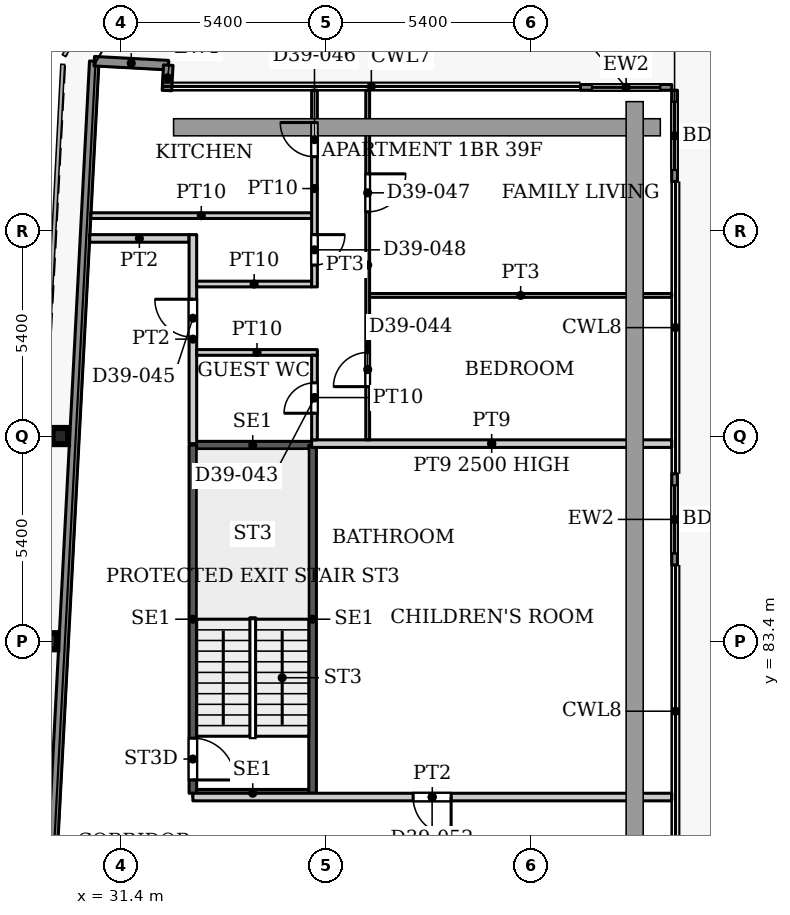
"""IFC4 building model, lengths in metres.
Left out: names, types, materials, properties, quantities, classifications, styles, units other than length and angle.
Written with IfcOpenShell. Run it as: python <this file> out.ifc"""

import sys

from ifc_helpers import new_model, si_unit, direction, frame, frame_2d, origin, origin_2d, place, context, subcontext, project, spatial, rectangle, i_section, extrude, source, transform, mapped, element, fill, save


model = new_model("IFC4")
c1 = context("Model", 3, precision=1e-05, world=origin(), true_north=direction((0.0, 1.0)))
c2 = subcontext(c1, "Body", "Model", "MODEL_VIEW")
j1 = project(units=[si_unit("LENGTHUNIT", "METRE"), si_unit("PLANEANGLEUNIT", "RADIAN")], contexts=[c1])
p1 = place(None, origin())
s1 = spatial("IfcSite", under=j1, at=p1, CompositionType="ELEMENT")
p2 = place(p1, origin())
s2 = spatial("IfcBuilding", under=s1, at=p2, CompositionType="ELEMENT")
p3 = place(p2, frame((0.0, 0.0, 168.2)))
s3 = spatial("IfcBuildingStorey", under=s2, at=p3, CompositionType="ELEMENT", Elevation=168.2)
for number, where, z_axis, x_axis in (
    (1, (29.527, 83.4, 0.0), (0.0, 0.0, 1.0), (1.0, 0.0, 0.0)),
    (2, (29.811, 88.8, 0.0), (0.0, 0.0, 1.0), (1.0, 0.0, 0.0)),
):
    element("IfcColumn", number, at=place(p3, frame(where, z_axis=z_axis, x_axis=x_axis)), inside=s3, PredefinedType="COLUMN", context=c2, shape_type="SweptSolid", body=[
        extrude(i_section(OverallWidth=0.409, OverallDepth=0.425, WebThickness=0.033, FlangeThickness=0.052, FilletRadius=0.013, at=origin_2d()), origin(), (0.0, 0.0, 1.0), 3.9),
    ])
p4 = place(p3, frame((27.195, 31.969, 0.0), z_axis=(0.0, 0.0, 1.0), x_axis=(0.052554995867, 0.998618031286, 0.0)))
e3 = element("IfcWall", 3, at=p4, inside=s3, PredefinedType="SOLIDWALL", context=c2, shape_type="SweptSolid", body=[
    extrude(rectangle(XDim=66.787, YDim=0.25, at=frame_2d((33.394, 0.0))), origin(), (0.0, 0.0, 1.0), 3.75),
])
p5 = place(p3, frame((30.705, 98.664, 0.0), z_axis=(0.0, 0.0, 1.0), x_axis=(0.998577785791, -0.053314216913, 0.0)))
e4 = element("IfcWall", 4, at=p5, inside=s3, PredefinedType="SOLIDWALL", context=c2, shape_type="SweptSolid", body=[
    extrude(rectangle(XDim=1.951, YDim=0.25, at=frame_2d((0.975, 0.0))), origin(), (0.0, 0.0, 1.0), 3.75),
])
p6 = place(p3, frame((32.653, 98.56, 0.0), z_axis=(0.0, 0.0, 1.0), x_axis=(-0.054093451632, -0.998535877418, 0.0)))
e5 = element("IfcWall", 5, at=p6, inside=s3, PredefinedType="SOLIDWALL", context=c2, shape_type="SweptSolid", body=[
    extrude(rectangle(XDim=0.668, YDim=0.25, at=frame_2d((0.334, 0.0))), origin(), (0.0, 0.0, 1.0), 3.75),
])
p7 = place(p3, frame((43.5, 97.975, 0.0), z_axis=(0.0, 0.0, 1.0), x_axis=(1.0, 0.0, 0.0)))
e6 = element("IfcWall", 6, at=p7, inside=s3, PredefinedType="SOLIDWALL", context=c2, shape_type="SweptSolid", body=[
    extrude(rectangle(XDim=2.4, YDim=0.15, at=frame_2d((1.2, 0.0))), origin(), (0.0, 0.0, 1.0), 3.75),
])
p8 = place(p7, frame((0.3, 0.0, 0.0)))
e7 = element("IfcOpeningElement", 7, at=p8, cuts=e6, PredefinedType="OPENING", context=c2, shape_type="SweptSolid", body=[
    extrude(rectangle(XDim=1.8, YDim=2.4, at=frame_2d((0.9, 1.2))), frame((0.0, 0.085, 0.0), z_axis=(0.0, -1.0, 0.0), x_axis=(1.0, 0.0, 0.0)), (0.0, 0.0, 1.0), 0.17),
])
p9 = place(p3, frame((45.975, 97.9, 0.0), z_axis=(0.0, 0.0, 1.0), x_axis=(0.0, -1.0, 0.0)))
e8 = element("IfcWall", 8, at=p9, inside=s3, PredefinedType="SOLIDWALL", context=c2, shape_type="SweptSolid", body=[
    extrude(rectangle(XDim=2.4, YDim=0.15, at=frame_2d((1.2, 0.0))), origin(), (0.0, 0.0, 1.0), 3.75),
])
p10 = place(p9, frame((0.3, 0.0, 0.0)))
e9 = element("IfcOpeningElement", 9, at=p10, cuts=e8, PredefinedType="OPENING", context=c2, shape_type="SweptSolid", body=[
    extrude(rectangle(XDim=1.8, YDim=2.4, at=frame_2d((0.9, 1.2))), frame((0.0, 0.085, 0.0), z_axis=(0.0, -1.0, 0.0), x_axis=(1.0, 0.0, 0.0)), (0.0, 0.0, 1.0), 0.17),
])
p11 = place(p3, frame((45.975, 87.806, 0.0), z_axis=(0.0, 0.0, 1.0), x_axis=(0.0, -1.0, 0.0)))
e10 = element("IfcWall", 10, at=p11, inside=s3, PredefinedType="SOLIDWALL", context=c2, shape_type="SweptSolid", body=[
    extrude(rectangle(XDim=2.4, YDim=0.15, at=frame_2d((1.2, 0.0))), origin(), (0.0, 0.0, 1.0), 3.75),
])
p12 = place(p11, frame((0.3, 0.0, 0.0)))
e11 = element("IfcOpeningElement", 11, at=p12, cuts=e10, PredefinedType="OPENING", context=c2, shape_type="SweptSolid", body=[
    extrude(rectangle(XDim=1.8, YDim=2.4, at=frame_2d((0.9, 1.2))), frame((0.0, 0.085, 0.0), z_axis=(0.0, -1.0, 0.0), x_axis=(1.0, 0.0, 0.0)), (0.0, 0.0, 1.0), 0.17),
])
for number, where, z_axis, x_axis in (
    (12, (33.3, 79.4, 0.0), (0.0, 0.0, 1.0), (1.0, 0.0, 0.0)),
    (13, (33.3, 88.56, 0.0), (0.0, 0.0, 1.0), (1.0, 0.0, 0.0)),
):
    element("IfcWall", number, at=place(p3, frame(where, z_axis=z_axis, x_axis=x_axis)), inside=s3, PredefinedType="SHEAR", context=c2, shape_type="SweptSolid", body=[
        extrude(rectangle(XDim=3.15, YDim=0.2, at=frame_2d((1.575, 0.0))), origin(), (0.0, 0.0, 1.0), 3.9),
    ])
p13 = place(p3, frame((33.3, 79.4, 0.0), z_axis=(0.0, 0.0, 1.0), x_axis=(0.0, 1.0, 0.0)))
e14 = element("IfcWall", 14, at=p13, inside=s3, PredefinedType="SHEAR", context=c2, shape_type="SweptSolid", body=[
    extrude(rectangle(XDim=9.16, YDim=0.2, at=frame_2d((4.58, 0.0))), origin(), (0.0, 0.0, 1.0), 3.9),
])
p14 = place(p13, frame((0.35, 0.0, 0.0)))
e15 = element("IfcOpeningElement", 15, at=p14, cuts=e14, PredefinedType="OPENING", context=c2, shape_type="SweptSolid", body=[
    extrude(rectangle(XDim=1.1, YDim=2.2, at=frame_2d((0.55, 1.1))), frame((0.0, 0.11, 0.0), z_axis=(0.0, -1.0, 0.0), x_axis=(1.0, 0.0, 0.0)), (0.0, 0.0, 1.0), 0.22),
])
p15 = place(p3, frame((36.45, 79.4, 0.0), z_axis=(0.0, 0.0, 1.0), x_axis=(0.0, 1.0, 0.0)))
e16 = element("IfcWall", 16, at=p15, inside=s3, PredefinedType="SHEAR", context=c2, shape_type="SweptSolid", body=[
    extrude(rectangle(XDim=9.16, YDim=0.2, at=frame_2d((4.58, 0.0))), origin(), (0.0, 0.0, 1.0), 3.9),
])
p16 = place(p3, frame((30.617, 94.6, 0.0), z_axis=(0.0, 0.0, 1.0), x_axis=(1.0, 0.0, 0.0)))
e17 = element("IfcWall", 17, at=p16, inside=s3, PredefinedType="PARTITIONING", context=c2, shape_type="SweptSolid", body=[
    extrude(rectangle(XDim=5.808, YDim=0.15, at=frame_2d((2.904, 0.0))), origin(), (0.0, 0.0, 1.0), 3.6),
])
p17 = place(p3, frame((30.585, 94.0, 0.0), z_axis=(0.0, 0.0, 1.0), x_axis=(1.0, 0.0, 0.0)))
e18 = element("IfcWall", 18, at=p17, inside=s3, PredefinedType="PARTITIONING", context=c2, shape_type="SweptSolid", body=[
    extrude(rectangle(XDim=2.615, YDim=0.2, at=frame_2d((1.308, 0.0))), origin(), (0.0, 0.0, 1.0), 3.6),
])
p18 = place(p3, frame((33.3, 79.3, 0.0), z_axis=(0.0, 0.0, 1.0), x_axis=(1.0, 0.0, 0.0)))
e19 = element("IfcWall", 19, at=p18, inside=s3, PredefinedType="PARTITIONING", context=c2, shape_type="SweptSolid", body=[
    extrude(rectangle(XDim=12.6, YDim=0.2, at=frame_2d((6.3, 0.0))), origin(), (0.0, 0.0, 1.0), 3.6),
])
p19 = place(p18, frame((5.795, 0.0, 0.0)))
e20 = element("IfcOpeningElement", 20, at=p19, cuts=e19, PredefinedType="OPENING", context=c2, shape_type="SweptSolid", body=[
    extrude(rectangle(XDim=1.0, YDim=2.1, at=frame_2d((0.5, 1.05))), frame((0.0, 0.11, 0.0), z_axis=(0.0, -1.0, 0.0), x_axis=(1.0, 0.0, 0.0)), (0.0, 0.0, 1.0), 0.22),
])
p20 = place(p3, frame((33.3, 88.6, 0.0), z_axis=(0.0, 0.0, 1.0), x_axis=(0.0, 1.0, 0.0)))
e21 = element("IfcWall", 21, at=p20, inside=s3, PredefinedType="PARTITIONING", context=c2, shape_type="SweptSolid", body=[
    extrude(rectangle(XDim=5.5, YDim=0.2, at=frame_2d((2.75, 0.0))), origin(), (0.0, 0.0, 1.0), 3.6),
])
p21 = place(p20, frame((2.8, 0.0, 0.0)))
e22 = element("IfcOpeningElement", 22, at=p21, cuts=e21, PredefinedType="OPENING", context=c2, shape_type="SweptSolid", body=[
    extrude(rectangle(XDim=1.0, YDim=2.1, at=frame_2d((0.5, 1.05))), frame((0.0, 0.11, 0.0), z_axis=(0.0, -1.0, 0.0), x_axis=(1.0, 0.0, 0.0)), (0.0, 0.0, 1.0), 0.22),
])
p22 = place(p3, frame((33.4, 91.0, 0.0), z_axis=(0.0, 0.0, 1.0), x_axis=(1.0, 0.0, 0.0)))
e23 = element("IfcWall", 23, at=p22, inside=s3, PredefinedType="PARTITIONING", context=c2, shape_type="SweptSolid", body=[
    extrude(rectangle(XDim=3.175, YDim=0.15, at=frame_2d((1.587, 0.0))), origin(), (0.0, 0.0, 1.0), 3.6),
])
p23 = place(p3, frame((33.4, 92.8, 0.0), z_axis=(0.0, 0.0, 1.0), x_axis=(1.0, 0.0, 0.0)))
e24 = element("IfcWall", 24, at=p23, inside=s3, PredefinedType="PARTITIONING", context=c2, shape_type="SweptSolid", body=[
    extrude(rectangle(XDim=3.025, YDim=0.15, at=frame_2d((1.513, 0.0))), origin(), (0.0, 0.0, 1.0), 3.6),
])
p24 = place(p3, frame((36.425, 88.6, 0.0), z_axis=(0.0, 0.0, 1.0), x_axis=(1.0, 0.0, 0.0)))
e25 = element("IfcWall", 25, at=p24, inside=s3, PredefinedType="PARTITIONING", context=c2, shape_type="SweptSolid", body=[
    extrude(rectangle(XDim=9.475, YDim=0.2, at=frame_2d((4.737, 0.0))), origin(), (0.0, 0.0, 1.0), 2.5),
])
p25 = place(p3, frame((36.5, 88.7, 0.0), z_axis=(0.0, 0.0, 1.0), x_axis=(0.0, 1.0, 0.0)))
e26 = element("IfcWall", 26, at=p25, inside=s3, PredefinedType="PARTITIONING", context=c2, shape_type="SweptSolid", body=[
    extrude(rectangle(XDim=2.225, YDim=0.15, at=frame_2d((1.113, 0.0))), origin(), (0.0, 0.0, 1.0), 3.6),
])
p26 = place(p25, frame((0.7, 0.0, 0.0)))
e27 = element("IfcOpeningElement", 27, at=p26, cuts=e26, PredefinedType="OPENING", context=c2, shape_type="SweptSolid", body=[
    extrude(rectangle(XDim=0.8, YDim=2.1, at=frame_2d((0.4, 1.05))), frame((0.0, 0.085, 0.0), z_axis=(0.0, -1.0, 0.0), x_axis=(1.0, 0.0, 0.0)), (0.0, 0.0, 1.0), 0.17),
])
p27 = place(p3, frame((36.5, 92.725, 0.0), z_axis=(0.0, 0.0, 1.0), x_axis=(0.0, 1.0, 0.0)))
e28 = element("IfcWall", 28, at=p27, inside=s3, PredefinedType="PARTITIONING", context=c2, shape_type="SweptSolid", body=[
    extrude(rectangle(XDim=5.175, YDim=0.15, at=frame_2d((2.587, 0.0))), origin(), (0.0, 0.0, 1.0), 3.6),
])
p28 = place(p27, frame((3.425, 0.0, 0.0)))
e29 = element("IfcOpeningElement", 29, at=p28, cuts=e28, PredefinedType="OPENING", context=c2, shape_type="SweptSolid", body=[
    extrude(rectangle(XDim=0.9, YDim=2.1, at=frame_2d((0.45, 1.05))), frame((0.0, 0.085, 0.0), z_axis=(0.0, -1.0, 0.0), x_axis=(1.0, 0.0, 0.0)), (0.0, 0.0, 1.0), 0.17),
])
p29 = place(p27, frame((0.575, 0.0, 0.0)))
e30 = element("IfcOpeningElement", 30, at=p29, cuts=e28, PredefinedType="OPENING", context=c2, shape_type="SweptSolid", body=[
    extrude(rectangle(XDim=0.8, YDim=2.1, at=frame_2d((0.4, 1.05))), frame((0.0, 0.085, 0.0), z_axis=(0.0, -1.0, 0.0), x_axis=(1.0, 0.0, 0.0)), (0.0, 0.0, 1.0), 0.17),
])
p30 = place(p3, frame((37.9, 88.7, 0.0), z_axis=(0.0, 0.0, 1.0), x_axis=(0.0, 1.0, 0.0)))
e31 = element("IfcWall", 31, at=p30, inside=s3, PredefinedType="PARTITIONING", context=c2, shape_type="SweptSolid", body=[
    extrude(rectangle(XDim=9.2, YDim=0.1, at=frame_2d((4.6, 0.0))), origin(), (0.0, 0.0, 1.0), 3.6),
])
p31 = place(p30, frame((1.4, 0.0, 0.0)))
e32 = element("IfcOpeningElement", 32, at=p31, cuts=e31, PredefinedType="OPENING", context=c2, shape_type="SweptSolid", body=[
    extrude(rectangle(XDim=0.9, YDim=2.1, at=frame_2d((0.45, 1.05))), frame((0.0, 0.06, 0.0), z_axis=(0.0, -1.0, 0.0), x_axis=(1.0, 0.0, 0.0)), (0.0, 0.0, 1.0), 0.12),
])
p32 = place(p30, frame((6.0, 0.0, 0.0)))
e33 = element("IfcOpeningElement", 33, at=p32, cuts=e31, PredefinedType="OPENING", context=c2, shape_type="SweptSolid", body=[
    extrude(rectangle(XDim=1.0, YDim=2.1, at=frame_2d((0.5, 1.05))), frame((0.0, 0.06, 0.0), z_axis=(0.0, -1.0, 0.0), x_axis=(1.0, 0.0, 0.0)), (0.0, 0.0, 1.0), 0.12),
])
p33 = place(p3, frame((37.95, 92.5, 0.0), z_axis=(0.0, 0.0, 1.0), x_axis=(1.0, 0.0, 0.0)))
e34 = element("IfcWall", 34, at=p33, inside=s3, PredefinedType="PARTITIONING", context=c2, shape_type="SweptSolid", body=[
    extrude(rectangle(XDim=7.95, YDim=0.1, at=frame_2d((3.975, 0.0))), origin(), (0.0, 0.0, 1.0), 3.6),
])
m1 = source(origin(), c2, "Body", "SweptSolid", [
    extrude(rectangle(XDim=1.8, YDim=2.4, at=frame_2d((0.9, 1.2))), frame((0.0, 0.025, 0.0), z_axis=(0.0, -1.0, 0.0), x_axis=(1.0, 0.0, 0.0)), (0.0, 0.0, 1.0), 0.05),
])
p34 = place(p8, origin())
e35 = element("IfcDoor", 35, at=p34, inside=s3, OperationType="SLIDING_TO_LEFT", PredefinedType="DOOR", context=c2, shape_type="MappedRepresentation", body=[
    mapped(m1, transform((0.0, 0.0, 0.0), x_axis=(1.0, 0.0, 0.0), y_axis=(0.0, 1.0, 0.0), z_axis=(0.0, 0.0, 1.0), scale=1.0)),
])
fill(e7, e35)
p35 = place(p10, origin())
e36 = element("IfcDoor", 36, at=p35, inside=s3, OperationType="SLIDING_TO_LEFT", PredefinedType="DOOR", context=c2, shape_type="MappedRepresentation", body=[
    mapped(m1, transform((0.0, 0.0, 0.0), x_axis=(1.0, 0.0, 0.0), y_axis=(0.0, 1.0, 0.0), z_axis=(0.0, 0.0, 1.0), scale=1.0)),
])
fill(e9, e36)
p36 = place(p12, origin())
e37 = element("IfcDoor", 37, at=p36, inside=s3, OperationType="SLIDING_TO_LEFT", PredefinedType="DOOR", context=c2, shape_type="MappedRepresentation", body=[
    mapped(m1, transform((0.0, 0.0, 0.0), x_axis=(1.0, 0.0, 0.0), y_axis=(0.0, 1.0, 0.0), z_axis=(0.0, 0.0, 1.0), scale=1.0)),
])
fill(e11, e37)
m2 = source(origin(), c2, "Body", "SweptSolid", [
    extrude(rectangle(XDim=1.1, YDim=2.2, at=frame_2d((0.55, 1.1))), frame((0.0, 0.025, 0.0), z_axis=(0.0, -1.0, 0.0), x_axis=(1.0, 0.0, 0.0)), (0.0, 0.0, 1.0), 0.05),
])
p37 = place(p14, origin())
e38 = element("IfcDoor", 38, at=p37, inside=s3, OperationType="SINGLE_SWING_RIGHT", PredefinedType="DOOR", context=c2, shape_type="MappedRepresentation", body=[
    mapped(m2, transform((0.0, 0.0, 0.0), x_axis=(1.0, 0.0, 0.0), y_axis=(0.0, 1.0, 0.0), z_axis=(0.0, 0.0, 1.0), scale=1.0)),
])
fill(e15, e38)
m3 = source(origin(), c2, "Body", "SweptSolid", [
    extrude(rectangle(XDim=0.8, YDim=2.1, at=frame_2d((0.4, 1.05))), frame((0.0, 0.025, 0.0), z_axis=(0.0, -1.0, 0.0), x_axis=(1.0, 0.0, 0.0)), (0.0, 0.0, 1.0), 0.05),
])
p38 = place(p26, origin())
e39 = element("IfcDoor", 39, at=p38, inside=s3, OperationType="SINGLE_SWING_LEFT", PredefinedType="DOOR", context=c2, shape_type="MappedRepresentation", body=[
    mapped(m3, transform((0.0, 0.0, 0.0), x_axis=(1.0, 0.0, 0.0), y_axis=(0.0, 1.0, 0.0), z_axis=(0.0, 0.0, 1.0), scale=1.0)),
])
fill(e27, e39)
m4 = source(origin(), c2, "Body", "SweptSolid", [
    extrude(rectangle(XDim=0.9, YDim=2.1, at=frame_2d((0.45, 1.05))), frame((0.0, 0.025, 0.0), z_axis=(0.0, -1.0, 0.0), x_axis=(1.0, 0.0, 0.0)), (0.0, 0.0, 1.0), 0.05),
])
p39 = place(p31, origin())
e40 = element("IfcDoor", 40, at=p39, inside=s3, OperationType="SINGLE_SWING_LEFT", PredefinedType="DOOR", context=c2, shape_type="MappedRepresentation", body=[
    mapped(m4, transform((0.0, 0.0, 0.0), x_axis=(1.0, 0.0, 0.0), y_axis=(0.0, 1.0, 0.0), z_axis=(0.0, 0.0, 1.0), scale=1.0)),
])
fill(e32, e40)
m5 = source(origin(), c2, "Body", "SweptSolid", [
    extrude(rectangle(XDim=1.0, YDim=2.1, at=frame_2d((0.5, 1.05))), frame((0.0, 0.025, 0.0), z_axis=(0.0, -1.0, 0.0), x_axis=(1.0, 0.0, 0.0)), (0.0, 0.0, 1.0), 0.05),
])
p40 = place(p21, origin())
e41 = element("IfcDoor", 41, at=p40, inside=s3, OperationType="SINGLE_SWING_LEFT", PredefinedType="DOOR", context=c2, shape_type="MappedRepresentation", body=[
    mapped(m5, transform((0.0, 0.0, 0.0), x_axis=(1.0, 0.0, 0.0), y_axis=(0.0, 1.0, 0.0), z_axis=(0.0, 0.0, 1.0), scale=1.0)),
])
fill(e22, e41)
p41 = place(p28, origin())
e42 = element("IfcDoor", 42, at=p41, inside=s3, OperationType="SINGLE_SWING_LEFT", PredefinedType="DOOR", context=c2, shape_type="MappedRepresentation", body=[
    mapped(m4, transform((0.0, 0.0, 0.0), x_axis=(1.0, 0.0, 0.0), y_axis=(0.0, 1.0, 0.0), z_axis=(0.0, 0.0, 1.0), scale=1.0)),
])
fill(e29, e42)
m6 = source(origin(), c2, "Body", "SweptSolid", [
    extrude(rectangle(XDim=1.0, YDim=2.1, at=frame_2d((0.5, 1.05))), frame((0.0, 0.025, 0.0), z_axis=(0.0, -1.0, 0.0), x_axis=(1.0, 0.0, 0.0)), (0.0, 0.0, 1.0), 0.05),
])
p42 = place(p32, origin())
e43 = element("IfcDoor", 43, at=p42, inside=s3, OperationType="SINGLE_SWING_RIGHT", PredefinedType="DOOR", context=c2, shape_type="MappedRepresentation", body=[
    mapped(m6, transform((0.0, 0.0, 0.0), x_axis=(1.0, 0.0, 0.0), y_axis=(0.0, 1.0, 0.0), z_axis=(0.0, 0.0, 1.0), scale=1.0)),
])
fill(e33, e43)
p43 = place(p29, origin())
e44 = element("IfcDoor", 44, at=p43, inside=s3, OperationType="SINGLE_SWING_RIGHT", PredefinedType="DOOR", context=c2, shape_type="MappedRepresentation", body=[
    mapped(m3, transform((0.0, 0.0, 0.0), x_axis=(1.0, 0.0, 0.0), y_axis=(0.0, 1.0, 0.0), z_axis=(0.0, 0.0, 1.0), scale=1.0)),
])
fill(e30, e44)
m7 = source(origin(), c2, "Body", "SweptSolid", [
    extrude(rectangle(XDim=1.0, YDim=2.1, at=frame_2d((0.5, 1.05))), frame((0.0, 0.025, 0.0), z_axis=(0.0, -1.0, 0.0), x_axis=(1.0, 0.0, 0.0)), (0.0, 0.0, 1.0), 0.05),
])
p44 = place(p19, origin())
e45 = element("IfcDoor", 45, at=p44, inside=s3, OperationType="SINGLE_SWING_RIGHT", PredefinedType="DOOR", context=c2, shape_type="MappedRepresentation", body=[
    mapped(m7, transform((0.0, 0.0, 0.0), x_axis=(1.0, 0.0, 0.0), y_axis=(0.0, 1.0, 0.0), z_axis=(0.0, 0.0, 1.0), scale=1.0)),
])
fill(e20, e45)
save(model, sys.argv[1])
